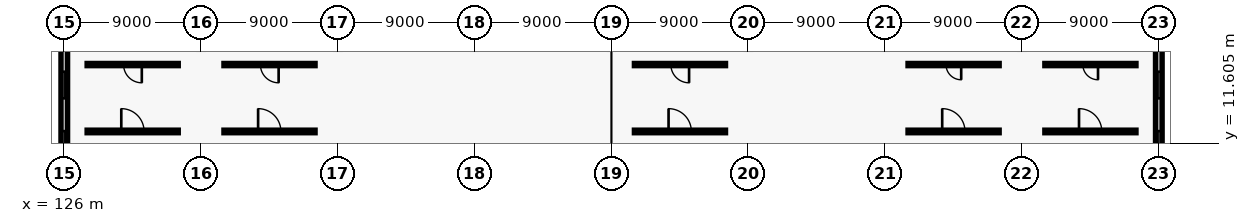
"""IFC4 building model, lengths in metres.
Left out: names, types, materials, properties, quantities, classifications, styles, units other than length and angle.
Written with IfcOpenShell. Run it as: python <this file> out.ifc"""

import sys

from ifc_helpers import new_model, si_unit, direction, frame, frame_2d, origin, place, context, subcontext, project, spatial, rectangle, extrude, element, fill, save


model = new_model("IFC4")
c1 = context("Model", 3, precision=1e-05, world=origin(), true_north=direction((0.0, 1.0)))
c2 = subcontext(c1, "Body", "Model", "MODEL_VIEW")
j1 = project(units=[si_unit("LENGTHUNIT", "METRE"), si_unit("PLANEANGLEUNIT", "RADIAN")], contexts=[c1])
p1 = place(None, origin())
s1 = spatial("IfcSite", under=j1, at=p1, CompositionType="ELEMENT")
p2 = place(p1, origin())
s2 = spatial("IfcBuilding", under=s1, at=p2, CompositionType="ELEMENT")
p3 = place(p2, frame((0.0, 0.0, 5.4)))
s3 = spatial("IfcBuildingStorey", under=s2, at=p3, CompositionType="ELEMENT", Elevation=5.4)
p4 = place(p3, frame((126.0, 9.06, 0.0), z_axis=(0.0, 0.0, 1.0), x_axis=(0.0, 1.0, 0.0)))
e1 = element("IfcWall", 1, at=p4, inside=s3, PredefinedType="SOLIDWALL", context=c2, shape_type="SweptSolid", body=[
    extrude(rectangle(XDim=8.88, YDim=0.44, at=frame_2d((4.44, 0.0))), origin(), (0.0, 0.0, 1.0), 3.5),
])
p5 = place(p4, frame((1.611, 0.0, 0.9)))
e2 = element("IfcOpeningElement", 2, at=p5, cuts=e1, PredefinedType="OPENING", context=c2, shape_type="SweptSolid", body=[
    extrude(rectangle(XDim=1.75, YDim=2.25, at=frame_2d((0.875, 1.125))), frame((0.0, 0.23, 0.0), z_axis=(0.0, -1.0, 0.0), x_axis=(1.0, 0.0, 0.0)), (0.0, 0.0, 1.0), 0.46),
])
p6 = place(p4, frame((5.519, 0.0, 0.9)))
e3 = element("IfcOpeningElement", 3, at=p6, cuts=e1, PredefinedType="OPENING", context=c2, shape_type="SweptSolid", body=[
    extrude(rectangle(XDim=1.75, YDim=2.25, at=frame_2d((0.875, 1.125))), frame((0.0, 0.23, 0.0), z_axis=(0.0, -1.0, 0.0), x_axis=(1.0, 0.0, 0.0)), (0.0, 0.0, 1.0), 0.46),
])
p7 = place(p3, frame((198.0, 9.06, 0.0), z_axis=(0.0, 0.0, 1.0), x_axis=(0.0, 1.0, 0.0)))
e4 = element("IfcWall", 4, at=p7, inside=s3, PredefinedType="SOLIDWALL", context=c2, shape_type="SweptSolid", body=[
    extrude(rectangle(XDim=8.88, YDim=0.44, at=frame_2d((4.44, 0.0))), origin(), (0.0, 0.0, 1.0), 3.5),
])
p8 = place(p7, frame((1.611, 0.0, 0.9)))
e5 = element("IfcOpeningElement", 5, at=p8, cuts=e4, PredefinedType="OPENING", context=c2, shape_type="SweptSolid", body=[
    extrude(rectangle(XDim=1.75, YDim=2.25, at=frame_2d((0.875, 1.125))), frame((0.0, 0.23, 0.0), z_axis=(0.0, -1.0, 0.0), x_axis=(1.0, 0.0, 0.0)), (0.0, 0.0, 1.0), 0.46),
])
p9 = place(p7, frame((5.519, 0.0, 0.9)))
e6 = element("IfcOpeningElement", 6, at=p9, cuts=e4, PredefinedType="OPENING", context=c2, shape_type="SweptSolid", body=[
    extrude(rectangle(XDim=1.75, YDim=2.25, at=frame_2d((0.875, 1.125))), frame((0.0, 0.23, 0.0), z_axis=(0.0, -1.0, 0.0), x_axis=(1.0, 0.0, 0.0)), (0.0, 0.0, 1.0), 0.46),
])
p10 = place(p3, frame((127.5, 12.4, 0.0), z_axis=(0.0, 0.0, 1.0), x_axis=(1.0, 0.0, 0.0)))
e7 = element("IfcWall", 7, at=p10, inside=s3, PredefinedType="PARTITIONING", context=c2, shape_type="SweptSolid", body=[
    extrude(rectangle(XDim=6.0, YDim=0.175, at=frame_2d((3.0, 0.0))), origin(), (0.0, 0.0, 1.0), 3.2),
])
p11 = place(p10, frame((2.25, 0.0, 0.0)))
e8 = element("IfcOpeningElement", 8, at=p11, cuts=e7, PredefinedType="OPENING", context=c2, shape_type="SweptSolid", body=[
    extrude(rectangle(XDim=1.5, YDim=2.2, at=frame_2d((0.75, 1.1))), frame((0.0, 0.097, 0.0), z_axis=(0.0, -1.0, 0.0), x_axis=(1.0, 0.0, 0.0)), (0.0, 0.0, 1.0), 0.195),
])
p12 = place(p3, frame((127.5, 16.8, 0.0), z_axis=(0.0, 0.0, 1.0), x_axis=(1.0, 0.0, 0.0)))
e9 = element("IfcWall", 9, at=p12, inside=s3, PredefinedType="PARTITIONING", context=c2, shape_type="SweptSolid", body=[
    extrude(rectangle(XDim=6.0, YDim=0.15, at=frame_2d((3.0, 0.0))), origin(), (0.0, 0.0, 1.0), 3.2),
])
p13 = place(p12, frame((2.4, 0.0, 0.0)))
e10 = element("IfcOpeningElement", 10, at=p13, cuts=e9, PredefinedType="OPENING", context=c2, shape_type="SweptSolid", body=[
    extrude(rectangle(XDim=1.2, YDim=2.2, at=frame_2d((0.6, 1.1))), frame((0.0, 0.085, 0.0), z_axis=(0.0, -1.0, 0.0), x_axis=(1.0, 0.0, 0.0)), (0.0, 0.0, 1.0), 0.17),
])
p14 = place(p3, frame((136.5, 12.4, 0.0), z_axis=(0.0, 0.0, 1.0), x_axis=(1.0, 0.0, 0.0)))
e11 = element("IfcWall", 11, at=p14, inside=s3, PredefinedType="PARTITIONING", context=c2, shape_type="SweptSolid", body=[
    extrude(rectangle(XDim=6.0, YDim=0.175, at=frame_2d((3.0, 0.0))), origin(), (0.0, 0.0, 1.0), 3.2),
])
p15 = place(p14, frame((2.25, 0.0, 0.0)))
e12 = element("IfcOpeningElement", 12, at=p15, cuts=e11, PredefinedType="OPENING", context=c2, shape_type="SweptSolid", body=[
    extrude(rectangle(XDim=1.5, YDim=2.2, at=frame_2d((0.75, 1.1))), frame((0.0, 0.097, 0.0), z_axis=(0.0, -1.0, 0.0), x_axis=(1.0, 0.0, 0.0)), (0.0, 0.0, 1.0), 0.195),
])
p16 = place(p3, frame((136.5, 16.8, 0.0), z_axis=(0.0, 0.0, 1.0), x_axis=(1.0, 0.0, 0.0)))
e13 = element("IfcWall", 13, at=p16, inside=s3, PredefinedType="PARTITIONING", context=c2, shape_type="SweptSolid", body=[
    extrude(rectangle(XDim=6.0, YDim=0.15, at=frame_2d((3.0, 0.0))), origin(), (0.0, 0.0, 1.0), 3.2),
])
p17 = place(p16, frame((2.4, 0.0, 0.0)))
e14 = element("IfcOpeningElement", 14, at=p17, cuts=e13, PredefinedType="OPENING", context=c2, shape_type="SweptSolid", body=[
    extrude(rectangle(XDim=1.2, YDim=2.2, at=frame_2d((0.6, 1.1))), frame((0.0, 0.085, 0.0), z_axis=(0.0, -1.0, 0.0), x_axis=(1.0, 0.0, 0.0)), (0.0, 0.0, 1.0), 0.17),
])
p18 = place(p3, frame((163.5, 12.4, 0.0), z_axis=(0.0, 0.0, 1.0), x_axis=(1.0, 0.0, 0.0)))
e15 = element("IfcWall", 15, at=p18, inside=s3, PredefinedType="PARTITIONING", context=c2, shape_type="SweptSolid", body=[
    extrude(rectangle(XDim=6.0, YDim=0.175, at=frame_2d((3.0, 0.0))), origin(), (0.0, 0.0, 1.0), 3.2),
])
p19 = place(p18, frame((2.25, 0.0, 0.0)))
e16 = element("IfcOpeningElement", 16, at=p19, cuts=e15, PredefinedType="OPENING", context=c2, shape_type="SweptSolid", body=[
    extrude(rectangle(XDim=1.5, YDim=2.2, at=frame_2d((0.75, 1.1))), frame((0.0, 0.097, 0.0), z_axis=(0.0, -1.0, 0.0), x_axis=(1.0, 0.0, 0.0)), (0.0, 0.0, 1.0), 0.195),
])
p20 = place(p3, frame((163.5, 16.8, 0.0), z_axis=(0.0, 0.0, 1.0), x_axis=(1.0, 0.0, 0.0)))
e17 = element("IfcWall", 17, at=p20, inside=s3, PredefinedType="PARTITIONING", context=c2, shape_type="SweptSolid", body=[
    extrude(rectangle(XDim=6.0, YDim=0.15, at=frame_2d((3.0, 0.0))), origin(), (0.0, 0.0, 1.0), 3.2),
])
p21 = place(p20, frame((2.4, 0.0, 0.0)))
e18 = element("IfcOpeningElement", 18, at=p21, cuts=e17, PredefinedType="OPENING", context=c2, shape_type="SweptSolid", body=[
    extrude(rectangle(XDim=1.2, YDim=2.2, at=frame_2d((0.6, 1.1))), frame((0.0, 0.085, 0.0), z_axis=(0.0, -1.0, 0.0), x_axis=(1.0, 0.0, 0.0)), (0.0, 0.0, 1.0), 0.17),
])
p22 = place(p3, frame((181.5, 12.4, 0.0), z_axis=(0.0, 0.0, 1.0), x_axis=(1.0, 0.0, 0.0)))
e19 = element("IfcWall", 19, at=p22, inside=s3, PredefinedType="PARTITIONING", context=c2, shape_type="SweptSolid", body=[
    extrude(rectangle(XDim=6.0, YDim=0.175, at=frame_2d((3.0, 0.0))), origin(), (0.0, 0.0, 1.0), 3.2),
])
p23 = place(p22, frame((2.25, 0.0, 0.0)))
e20 = element("IfcOpeningElement", 20, at=p23, cuts=e19, PredefinedType="OPENING", context=c2, shape_type="SweptSolid", body=[
    extrude(rectangle(XDim=1.5, YDim=2.2, at=frame_2d((0.75, 1.1))), frame((0.0, 0.097, 0.0), z_axis=(0.0, -1.0, 0.0), x_axis=(1.0, 0.0, 0.0)), (0.0, 0.0, 1.0), 0.195),
])
p24 = place(p3, frame((181.5, 16.8, 0.0), z_axis=(0.0, 0.0, 1.0), x_axis=(1.0, 0.0, 0.0)))
e21 = element("IfcWall", 21, at=p24, inside=s3, PredefinedType="PARTITIONING", context=c2, shape_type="SweptSolid", body=[
    extrude(rectangle(XDim=6.0, YDim=0.15, at=frame_2d((3.0, 0.0))), origin(), (0.0, 0.0, 1.0), 3.2),
])
p25 = place(p24, frame((2.5, 0.0, 0.0)))
e22 = element("IfcOpeningElement", 22, at=p25, cuts=e21, PredefinedType="OPENING", context=c2, shape_type="SweptSolid", body=[
    extrude(rectangle(XDim=1.0, YDim=2.1, at=frame_2d((0.5, 1.05))), frame((0.0, 0.085, 0.0), z_axis=(0.0, -1.0, 0.0), x_axis=(1.0, 0.0, 0.0)), (0.0, 0.0, 1.0), 0.17),
])
p26 = place(p3, frame((190.5, 12.4, 0.0), z_axis=(0.0, 0.0, 1.0), x_axis=(1.0, 0.0, 0.0)))
e23 = element("IfcWall", 23, at=p26, inside=s3, PredefinedType="PARTITIONING", context=c2, shape_type="SweptSolid", body=[
    extrude(rectangle(XDim=6.0, YDim=0.175, at=frame_2d((3.0, 0.0))), origin(), (0.0, 0.0, 1.0), 3.2),
])
p27 = place(p26, frame((2.25, 0.0, 0.0)))
e24 = element("IfcOpeningElement", 24, at=p27, cuts=e23, PredefinedType="OPENING", context=c2, shape_type="SweptSolid", body=[
    extrude(rectangle(XDim=1.5, YDim=2.2, at=frame_2d((0.75, 1.1))), frame((0.0, 0.097, 0.0), z_axis=(0.0, -1.0, 0.0), x_axis=(1.0, 0.0, 0.0)), (0.0, 0.0, 1.0), 0.195),
])
p28 = place(p3, frame((190.5, 16.8, 0.0), z_axis=(0.0, 0.0, 1.0), x_axis=(1.0, 0.0, 0.0)))
e25 = element("IfcWall", 25, at=p28, inside=s3, PredefinedType="PARTITIONING", context=c2, shape_type="SweptSolid", body=[
    extrude(rectangle(XDim=6.0, YDim=0.15, at=frame_2d((3.0, 0.0))), origin(), (0.0, 0.0, 1.0), 3.2),
])
p29 = place(p28, frame((2.5, 0.0, 0.0)))
e26 = element("IfcOpeningElement", 26, at=p29, cuts=e25, PredefinedType="OPENING", context=c2, shape_type="SweptSolid", body=[
    extrude(rectangle(XDim=1.0, YDim=2.1, at=frame_2d((0.5, 1.05))), frame((0.0, 0.085, 0.0), z_axis=(0.0, -1.0, 0.0), x_axis=(1.0, 0.0, 0.0)), (0.0, 0.0, 1.0), 0.17),
])
p30 = place(p5, origin())
e27 = element("IfcWindow", 27, at=p30, inside=s3, PartitioningType="SINGLE_PANEL", PredefinedType="WINDOW", context=c2, shape_type="SweptSolid", body=[
    extrude(rectangle(XDim=1.75, YDim=2.25, at=frame_2d((0.875, 1.125))), frame((0.0, 0.03, 0.0), z_axis=(0.0, -1.0, 0.0), x_axis=(1.0, 0.0, 0.0)), (0.0, 0.0, 1.0), 0.06),
])
fill(e2, e27)
p31 = place(p6, origin())
e28 = element("IfcWindow", 28, at=p31, inside=s3, PartitioningType="SINGLE_PANEL", PredefinedType="WINDOW", context=c2, shape_type="SweptSolid", body=[
    extrude(rectangle(XDim=1.75, YDim=2.25, at=frame_2d((0.875, 1.125))), frame((0.0, 0.03, 0.0), z_axis=(0.0, -1.0, 0.0), x_axis=(1.0, 0.0, 0.0)), (0.0, 0.0, 1.0), 0.06),
])
fill(e3, e28)
p32 = place(p8, origin())
e29 = element("IfcWindow", 29, at=p32, inside=s3, PartitioningType="SINGLE_PANEL", PredefinedType="WINDOW", context=c2, shape_type="SweptSolid", body=[
    extrude(rectangle(XDim=1.75, YDim=2.25, at=frame_2d((0.875, 1.125))), frame((0.0, 0.03, 0.0), z_axis=(0.0, -1.0, 0.0), x_axis=(1.0, 0.0, 0.0)), (0.0, 0.0, 1.0), 0.06),
])
fill(e5, e29)
p33 = place(p9, origin())
e30 = element("IfcWindow", 30, at=p33, inside=s3, PartitioningType="SINGLE_PANEL", PredefinedType="WINDOW", context=c2, shape_type="SweptSolid", body=[
    extrude(rectangle(XDim=1.75, YDim=2.25, at=frame_2d((0.875, 1.125))), frame((0.0, 0.03, 0.0), z_axis=(0.0, -1.0, 0.0), x_axis=(1.0, 0.0, 0.0)), (0.0, 0.0, 1.0), 0.06),
])
fill(e6, e30)
p34 = place(p11, origin())
e31 = element("IfcDoor", 31, at=p34, inside=s3, OperationType="DOUBLE_DOOR_SINGLE_SWING", PredefinedType="DOOR", context=c2, shape_type="SweptSolid", body=[
    extrude(rectangle(XDim=1.5, YDim=2.2, at=frame_2d((0.75, 1.1))), frame((0.0, 0.025, 0.0), z_axis=(0.0, -1.0, 0.0), x_axis=(1.0, 0.0, 0.0)), (0.0, 0.0, 1.0), 0.05),
])
fill(e8, e31)
p35 = place(p13, origin())
e32 = element("IfcDoor", 32, at=p35, inside=s3, OperationType="SINGLE_SWING_RIGHT", PredefinedType="DOOR", context=c2, shape_type="SweptSolid", body=[
    extrude(rectangle(XDim=1.2, YDim=2.2, at=frame_2d((0.6, 1.1))), frame((0.0, 0.025, 0.0), z_axis=(0.0, -1.0, 0.0), x_axis=(1.0, 0.0, 0.0)), (0.0, 0.0, 1.0), 0.05),
])
fill(e10, e32)
p36 = place(p15, origin())
e33 = element("IfcDoor", 33, at=p36, inside=s3, OperationType="DOUBLE_DOOR_SINGLE_SWING", PredefinedType="DOOR", context=c2, shape_type="SweptSolid", body=[
    extrude(rectangle(XDim=1.5, YDim=2.2, at=frame_2d((0.75, 1.1))), frame((0.0, 0.025, 0.0), z_axis=(0.0, -1.0, 0.0), x_axis=(1.0, 0.0, 0.0)), (0.0, 0.0, 1.0), 0.05),
])
fill(e12, e33)
p37 = place(p17, origin())
e34 = element("IfcDoor", 34, at=p37, inside=s3, OperationType="SINGLE_SWING_RIGHT", PredefinedType="DOOR", context=c2, shape_type="SweptSolid", body=[
    extrude(rectangle(XDim=1.2, YDim=2.2, at=frame_2d((0.6, 1.1))), frame((0.0, 0.025, 0.0), z_axis=(0.0, -1.0, 0.0), x_axis=(1.0, 0.0, 0.0)), (0.0, 0.0, 1.0), 0.05),
])
fill(e14, e34)
p38 = place(p19, origin())
e35 = element("IfcDoor", 35, at=p38, inside=s3, OperationType="DOUBLE_DOOR_SINGLE_SWING", PredefinedType="DOOR", context=c2, shape_type="SweptSolid", body=[
    extrude(rectangle(XDim=1.5, YDim=2.2, at=frame_2d((0.75, 1.1))), frame((0.0, 0.025, 0.0), z_axis=(0.0, -1.0, 0.0), x_axis=(1.0, 0.0, 0.0)), (0.0, 0.0, 1.0), 0.05),
])
fill(e16, e35)
p39 = place(p21, origin())
e36 = element("IfcDoor", 36, at=p39, inside=s3, OperationType="SINGLE_SWING_RIGHT", PredefinedType="DOOR", context=c2, shape_type="SweptSolid", body=[
    extrude(rectangle(XDim=1.2, YDim=2.2, at=frame_2d((0.6, 1.1))), frame((0.0, 0.025, 0.0), z_axis=(0.0, -1.0, 0.0), x_axis=(1.0, 0.0, 0.0)), (0.0, 0.0, 1.0), 0.05),
])
fill(e18, e36)
p40 = place(p23, origin())
e37 = element("IfcDoor", 37, at=p40, inside=s3, OperationType="DOUBLE_DOOR_SINGLE_SWING", PredefinedType="DOOR", context=c2, shape_type="SweptSolid", body=[
    extrude(rectangle(XDim=1.5, YDim=2.2, at=frame_2d((0.75, 1.1))), frame((0.0, 0.025, 0.0), z_axis=(0.0, -1.0, 0.0), x_axis=(1.0, 0.0, 0.0)), (0.0, 0.0, 1.0), 0.05),
])
fill(e20, e37)
p41 = place(p25, origin())
e38 = element("IfcDoor", 38, at=p41, inside=s3, OperationType="SINGLE_SWING_RIGHT", PredefinedType="DOOR", context=c2, shape_type="SweptSolid", body=[
    extrude(rectangle(XDim=1.0, YDim=2.1, at=frame_2d((0.5, 1.05))), frame((0.0, 0.025, 0.0), z_axis=(0.0, -1.0, 0.0), x_axis=(1.0, 0.0, 0.0)), (0.0, 0.0, 1.0), 0.05),
])
fill(e22, e38)
p42 = place(p27, origin())
e39 = element("IfcDoor", 39, at=p42, inside=s3, OperationType="DOUBLE_DOOR_SINGLE_SWING", PredefinedType="DOOR", context=c2, shape_type="SweptSolid", body=[
    extrude(rectangle(XDim=1.5, YDim=2.2, at=frame_2d((0.75, 1.1))), frame((0.0, 0.025, 0.0), z_axis=(0.0, -1.0, 0.0), x_axis=(1.0, 0.0, 0.0)), (0.0, 0.0, 1.0), 0.05),
])
fill(e24, e39)
p43 = place(p29, origin())
e40 = element("IfcDoor", 40, at=p43, inside=s3, OperationType="SINGLE_SWING_RIGHT", PredefinedType="DOOR", context=c2, shape_type="SweptSolid", body=[
    extrude(rectangle(XDim=1.0, YDim=2.1, at=frame_2d((0.5, 1.05))), frame((0.0, 0.025, 0.0), z_axis=(0.0, -1.0, 0.0), x_axis=(1.0, 0.0, 0.0)), (0.0, 0.0, 1.0), 0.05),
])
fill(e26, e40)
save(model, sys.argv[1])
